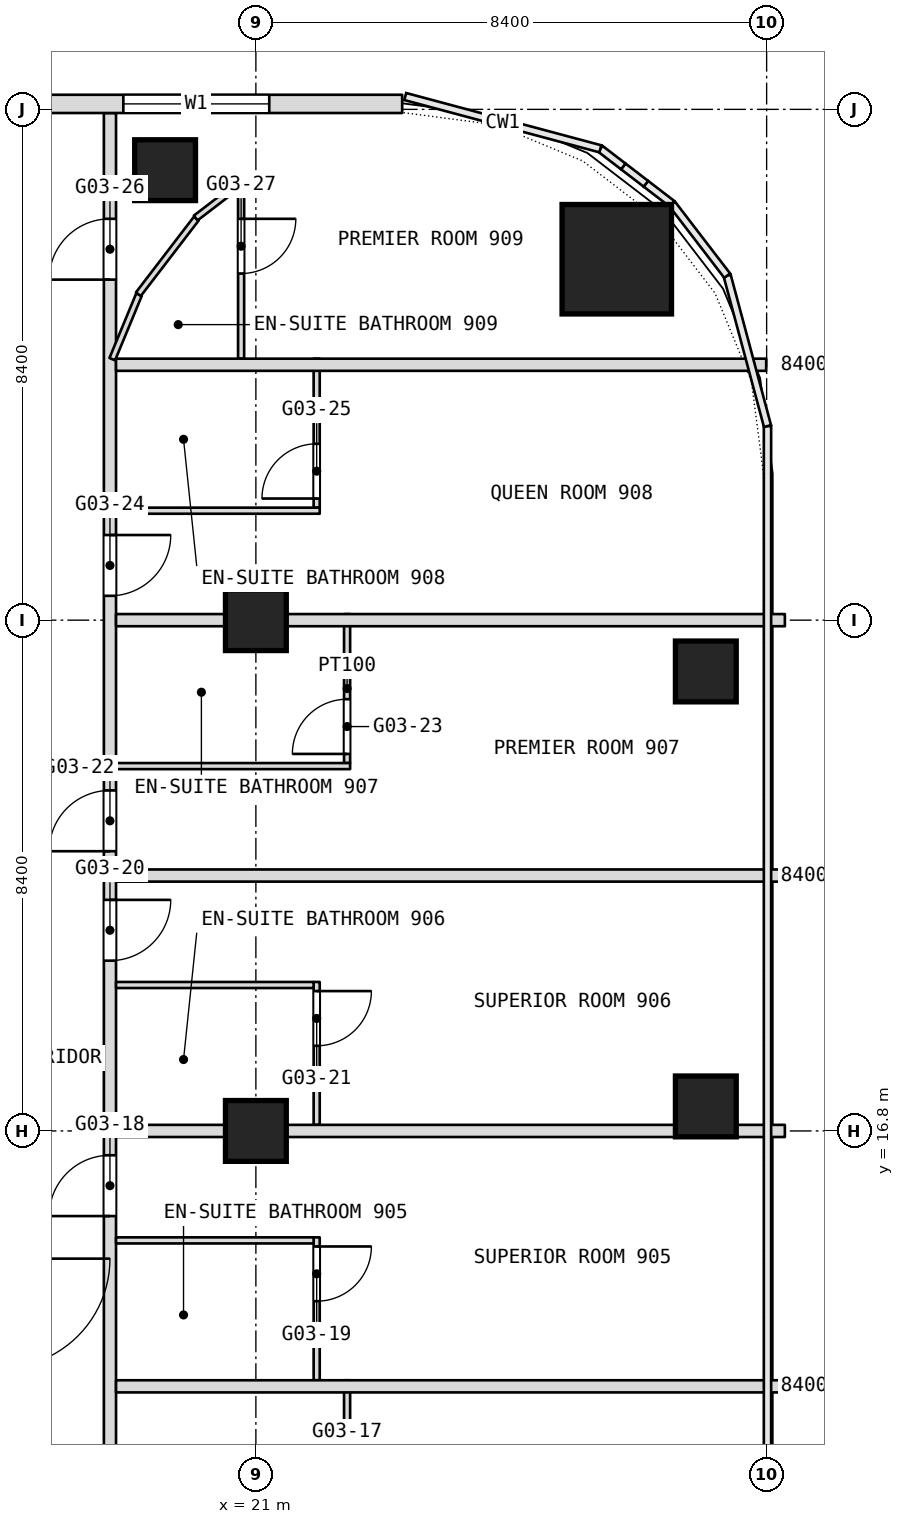
"""IFC4 building model, lengths in metres.
Left out: names, types, materials, properties, quantities, classifications, styles, units other than length and angle.
Written with IfcOpenShell. Run it as: python <this file> out.ifc"""

import sys

from ifc_helpers import new_model, si_unit, direction, frame, frame_2d, origin, origin_2d, place, context, subcontext, project, spatial, rectangle, extrude, element, fill, save


model = new_model("IFC4")
c1 = context("Model", 3, precision=1e-05, world=origin(), true_north=direction((0.0, 1.0)))
c2 = subcontext(c1, "Body", "Model", "MODEL_VIEW")
j1 = project(units=[si_unit("LENGTHUNIT", "METRE"), si_unit("PLANEANGLEUNIT", "RADIAN")], contexts=[c1])
p1 = place(None, origin())
s1 = spatial("IfcSite", under=j1, at=p1, CompositionType="ELEMENT")
p2 = place(p1, origin())
s2 = spatial("IfcBuilding", under=s1, at=p2, CompositionType="ELEMENT")
p3 = place(p2, frame((0.0, 0.0, 47.3)))
s3 = spatial("IfcBuildingStorey", under=s2, at=p3, CompositionType="ELEMENT", Elevation=47.3)
p4 = place(p3, frame((26.936, 31.135, 0.0), z_axis=(0.0, 0.0, 1.0), x_axis=(1.0, 0.0, 0.0)))
e1 = element("IfcColumn", 1, at=p4, inside=s3, PredefinedType="COLUMN", context=c2, shape_type="SweptSolid", body=[
    extrude(rectangle(XDim=1.8, YDim=1.8, at=origin_2d()), origin(), (0.0, 0.0, 1.0), 3.6),
])
for number, where, z_axis, x_axis in (
    (2, (21.0, 16.8, 0.0), (0.0, 0.0, 1.0), (1.0, 0.0, 0.0)),
    (3, (21.0, 25.2, 0.0), (0.0, 0.0, 1.0), (1.0, 0.0, 0.0)),
    (4, (19.507, 32.6, 0.0), (0.0, 0.0, 1.0), (1.0, 0.0, 0.0)),
    (5, (28.4, 24.356, 0.0), (0.0, 0.0, 1.0), (1.0, 0.0, 0.0)),
    (6, (28.4, 17.203, 0.0), (0.0, 0.0, 1.0), (1.0, 0.0, 0.0)),
):
    element("IfcColumn", number, at=place(p3, frame(where, z_axis=z_axis, x_axis=x_axis)), inside=s3, PredefinedType="COLUMN", context=c2, shape_type="SweptSolid", body=[
        extrude(rectangle(XDim=1.0, YDim=1.0, at=origin_2d()), origin(), (0.0, 0.0, 1.0), 3.6),
    ])
p5 = place(p3, frame((22.5, 10.25, 0.0), z_axis=(0.0, 0.0, 1.0), x_axis=(0.0, 1.0, 0.0)))
e7 = element("IfcWall", 7, at=p5, inside=s3, PredefinedType="PARTITIONING", context=c2, shape_type="SweptSolid", body=[
    extrude(rectangle(XDim=2.45, YDim=0.1, at=frame_2d((1.225, 0.0))), origin(), (0.0, 0.0, 1.0), 3.34),
])
p6 = place(p5, frame((0.15, 0.0, 0.0)))
e8 = element("IfcOpeningElement", 8, at=p6, cuts=e7, PredefinedType="OPENING", context=c2, shape_type="SweptSolid", body=[
    extrude(rectangle(XDim=0.9, YDim=2.1, at=frame_2d((0.45, 1.05))), frame((0.0, 0.05, 0.0), z_axis=(0.0, -1.0, 0.0), x_axis=(1.0, 0.0, 0.0)), (0.0, 0.0, 1.0), 0.1),
])
p7 = place(p3, frame((22.5, 22.85, 0.0), z_axis=(0.0, 0.0, 1.0), x_axis=(0.0, 1.0, 0.0)))
e9 = element("IfcWall", 9, at=p7, inside=s3, PredefinedType="PARTITIONING", context=c2, shape_type="SweptSolid", body=[
    extrude(rectangle(XDim=2.45, YDim=0.1, at=frame_2d((1.225, 0.0))), origin(), (0.0, 0.0, 1.0), 3.34),
])
p8 = place(p7, frame((0.15, 0.0, 0.0)))
e10 = element("IfcOpeningElement", 10, at=p8, cuts=e9, PredefinedType="OPENING", context=c2, shape_type="SweptSolid", body=[
    extrude(rectangle(XDim=0.9, YDim=2.1, at=frame_2d((0.45, 1.05))), frame((0.0, 0.05, 0.0), z_axis=(0.0, -1.0, 0.0), x_axis=(1.0, 0.0, 0.0)), (0.0, 0.0, 1.0), 0.1),
])
p9 = place(p3, frame((22.0, 12.7, 0.0), z_axis=(0.0, 0.0, 1.0), x_axis=(0.0, 1.0, 0.0)))
e11 = element("IfcWall", 11, at=p9, inside=s3, PredefinedType="PARTITIONING", context=c2, shape_type="SweptSolid", body=[
    extrude(rectangle(XDim=2.35, YDim=0.1, at=frame_2d((1.175, 0.0))), origin(), (0.0, 0.0, 1.0), 3.34),
])
p10 = place(p9, frame((1.3, 0.0, 0.0)))
e12 = element("IfcOpeningElement", 12, at=p10, cuts=e11, PredefinedType="OPENING", context=c2, shape_type="SweptSolid", body=[
    extrude(rectangle(XDim=0.9, YDim=2.1, at=frame_2d((0.45, 1.05))), frame((0.0, 0.05, 0.0), z_axis=(0.0, -1.0, 0.0), x_axis=(1.0, 0.0, 0.0)), (0.0, 0.0, 1.0), 0.1),
])
p11 = place(p3, frame((22.0, 16.9, 0.0), z_axis=(0.0, 0.0, 1.0), x_axis=(0.0, 1.0, 0.0)))
e13 = element("IfcWall", 13, at=p11, inside=s3, PredefinedType="PARTITIONING", context=c2, shape_type="SweptSolid", body=[
    extrude(rectangle(XDim=2.35, YDim=0.1, at=frame_2d((1.175, 0.0))), origin(), (0.0, 0.0, 1.0), 3.34),
])
p12 = place(p11, frame((1.3, 0.0, 0.0)))
e14 = element("IfcOpeningElement", 14, at=p12, cuts=e13, PredefinedType="OPENING", context=c2, shape_type="SweptSolid", body=[
    extrude(rectangle(XDim=0.9, YDim=2.1, at=frame_2d((0.45, 1.05))), frame((0.0, 0.05, 0.0), z_axis=(0.0, -1.0, 0.0), x_axis=(1.0, 0.0, 0.0)), (0.0, 0.0, 1.0), 0.1),
])
p13 = place(p3, frame((22.0, 27.05, 0.0), z_axis=(0.0, 0.0, 1.0), x_axis=(0.0, 1.0, 0.0)))
e15 = element("IfcWall", 15, at=p13, inside=s3, PredefinedType="PARTITIONING", context=c2, shape_type="SweptSolid", body=[
    extrude(rectangle(XDim=2.45, YDim=0.1, at=frame_2d((1.225, 0.0))), origin(), (0.0, 0.0, 1.0), 3.34),
])
p14 = place(p13, frame((0.15, 0.0, 0.0)))
e16 = element("IfcOpeningElement", 16, at=p14, cuts=e15, PredefinedType="OPENING", context=c2, shape_type="SweptSolid", body=[
    extrude(rectangle(XDim=0.9, YDim=2.1, at=frame_2d((0.45, 1.05))), frame((0.0, 0.05, 0.0), z_axis=(0.0, -1.0, 0.0), x_axis=(1.0, 0.0, 0.0)), (0.0, 0.0, 1.0), 0.1),
])
p15 = place(p3, frame((20.757, 29.5, 0.0), z_axis=(0.0, 0.0, 1.0), x_axis=(0.0, 1.0, 0.0)))
e17 = element("IfcWall", 17, at=p15, inside=s3, PredefinedType="PARTITIONING", context=c2, shape_type="SweptSolid", body=[
    extrude(rectangle(XDim=2.935, YDim=0.1, at=frame_2d((1.468, 0.0))), origin(), (0.0, 0.0, 1.0), 3.34),
])
p16 = place(p15, frame((1.4, 0.0, 0.0)))
e18 = element("IfcOpeningElement", 18, at=p16, cuts=e17, PredefinedType="OPENING", context=c2, shape_type="SweptSolid", body=[
    extrude(rectangle(XDim=0.9, YDim=2.1, at=frame_2d((0.45, 1.05))), frame((0.0, 0.05, 0.0), z_axis=(0.0, -1.0, 0.0), x_axis=(1.0, 0.0, 0.0)), (0.0, 0.0, 1.0), 0.1),
])
p17 = place(p3, frame((18.6, -16.665, 0.0), z_axis=(0.0, 0.0, 1.0), x_axis=(0.0, 1.0, 0.0)))
e19 = element("IfcWall", 19, at=p17, inside=s3, PredefinedType="PARTITIONING", context=c2, shape_type="SweptSolid", body=[
    extrude(rectangle(XDim=50.205, YDim=0.2, at=frame_2d((25.103, 0.0))), origin(), (0.0, 0.0, 1.0), 3.34),
])
p18 = place(p17, frame((5.724, 0.0, 0.0)))
e20 = element("IfcOpeningElement", 20, at=p18, cuts=e19, PredefinedType="OPENING", context=c2, shape_type="SweptSolid", body=[
    extrude(rectangle(XDim=1.1, YDim=2.1, at=frame_2d((0.55, 1.05))), frame((0.0, 0.1, 0.0), z_axis=(0.0, -1.0, 0.0), x_axis=(1.0, 0.0, 0.0)), (0.0, 0.0, 1.0), 0.2),
])
p19 = place(p17, frame((11.865, 0.0, 0.0)))
e21 = element("IfcOpeningElement", 21, at=p19, cuts=e19, PredefinedType="OPENING", context=c2, shape_type="SweptSolid", body=[
    extrude(rectangle(XDim=1.1, YDim=2.1, at=frame_2d((0.55, 1.05))), frame((0.0, 0.1, 0.0), z_axis=(0.0, -1.0, 0.0), x_axis=(1.0, 0.0, 0.0)), (0.0, 0.0, 1.0), 0.2),
])
p20 = place(p17, frame((20.365, 0.0, 0.0)))
e22 = element("IfcOpeningElement", 22, at=p20, cuts=e19, PredefinedType="OPENING", context=c2, shape_type="SweptSolid", body=[
    extrude(rectangle(XDim=1.1, YDim=2.1, at=frame_2d((0.55, 1.05))), frame((0.0, 0.1, 0.0), z_axis=(0.0, -1.0, 0.0), x_axis=(1.0, 0.0, 0.0)), (0.0, 0.0, 1.0), 0.2),
])
p21 = place(p17, frame((25.465, 0.0, 0.0)))
e23 = element("IfcOpeningElement", 23, at=p21, cuts=e19, PredefinedType="OPENING", context=c2, shape_type="SweptSolid", body=[
    extrude(rectangle(XDim=1.0, YDim=2.1, at=frame_2d((0.5, 1.05))), frame((0.0, 0.1, 0.0), z_axis=(0.0, -1.0, 0.0), x_axis=(1.0, 0.0, 0.0)), (0.0, 0.0, 1.0), 0.2),
])
p22 = place(p17, frame((32.065, 0.0, 0.0)))
e24 = element("IfcOpeningElement", 24, at=p22, cuts=e19, PredefinedType="OPENING", context=c2, shape_type="SweptSolid", body=[
    extrude(rectangle(XDim=1.0, YDim=2.1, at=frame_2d((0.5, 1.05))), frame((0.0, 0.1, 0.0), z_axis=(0.0, -1.0, 0.0), x_axis=(1.0, 0.0, 0.0)), (0.0, 0.0, 1.0), 0.2),
])
p23 = place(p17, frame((36.265, 0.0, 0.0)))
e25 = element("IfcOpeningElement", 25, at=p23, cuts=e19, PredefinedType="OPENING", context=c2, shape_type="SweptSolid", body=[
    extrude(rectangle(XDim=1.0, YDim=2.1, at=frame_2d((0.5, 1.05))), frame((0.0, 0.1, 0.0), z_axis=(0.0, -1.0, 0.0), x_axis=(1.0, 0.0, 0.0)), (0.0, 0.0, 1.0), 0.2),
])
p24 = place(p17, frame((38.065, 0.0, 0.0)))
e26 = element("IfcOpeningElement", 26, at=p24, cuts=e19, PredefinedType="OPENING", context=c2, shape_type="SweptSolid", body=[
    extrude(rectangle(XDim=1.0, YDim=2.1, at=frame_2d((0.5, 1.05))), frame((0.0, 0.1, 0.0), z_axis=(0.0, -1.0, 0.0), x_axis=(1.0, 0.0, 0.0)), (0.0, 0.0, 1.0), 0.2),
])
p25 = place(p17, frame((42.265, 0.0, 0.0)))
e27 = element("IfcOpeningElement", 27, at=p25, cuts=e19, PredefinedType="OPENING", context=c2, shape_type="SweptSolid", body=[
    extrude(rectangle(XDim=1.0, YDim=2.1, at=frame_2d((0.5, 1.05))), frame((0.0, 0.1, 0.0), z_axis=(0.0, -1.0, 0.0), x_axis=(1.0, 0.0, 0.0)), (0.0, 0.0, 1.0), 0.2),
])
p26 = place(p17, frame((47.465, 0.0, 0.0)))
e28 = element("IfcOpeningElement", 28, at=p26, cuts=e19, PredefinedType="OPENING", context=c2, shape_type="SweptSolid", body=[
    extrude(rectangle(XDim=1.0, YDim=2.1, at=frame_2d((0.5, 1.05))), frame((0.0, 0.1, 0.0), z_axis=(0.0, -1.0, 0.0), x_axis=(1.0, 0.0, 0.0)), (0.0, 0.0, 1.0), 0.2),
])
p27 = place(p3, frame((18.638, 29.492, 0.0), z_axis=(0.0, 0.0, 1.0), x_axis=(0.382714431757, 0.923866691533, 0.0)))
e29 = element("IfcWall", 29, at=p27, inside=s3, PredefinedType="PARTITIONING", context=c2, shape_type="SweptSolid", body=[
    extrude(rectangle(XDim=1.149, YDim=0.1, at=frame_2d((0.575, 0.0))), origin(), (0.0, 0.0, 1.0), 3.34),
])
p28 = place(p3, frame((19.067, 30.56, 0.0), z_axis=(0.0, 0.0, 1.0), x_axis=(0.608519892166, 0.793538619626, 0.0)))
e30 = element("IfcWall", 30, at=p28, inside=s3, PredefinedType="PARTITIONING", context=c2, shape_type="SweptSolid", body=[
    extrude(rectangle(XDim=1.566, YDim=0.1, at=frame_2d((0.783, 0.0))), origin(), (0.0, 0.0, 1.0), 3.34),
])
p29 = place(p3, frame((18.7, 12.6, 0.0), z_axis=(0.0, 0.0, 1.0), x_axis=(1.0, 0.0, 0.0)))
e31 = element("IfcWall", 31, at=p29, inside=s3, PredefinedType="PARTITIONING", context=c2, shape_type="SweptSolid", body=[
    extrude(rectangle(XDim=11.0, YDim=0.2, at=frame_2d((5.5, 0.0))), origin(), (0.0, 0.0, 1.0), 3.34),
])
p30 = place(p3, frame((20.01, 31.813, 0.0), z_axis=(0.0, 0.0, 1.0), x_axis=(0.793641646693, 0.608385516457, 0.0)))
e32 = element("IfcWall", 32, at=p30, inside=s3, PredefinedType="PARTITIONING", context=c2, shape_type="SweptSolid", body=[
    extrude(rectangle(XDim=0.891, YDim=0.1, at=frame_2d((0.445, 0.0))), origin(), (0.0, 0.0, 1.0), 3.34),
])
p31 = place(p3, frame((18.7, 15.0, 0.0), z_axis=(0.0, 0.0, 1.0), x_axis=(1.0, 0.0, 0.0)))
e33 = element("IfcWall", 33, at=p31, inside=s3, PredefinedType="PARTITIONING", context=c2, shape_type="SweptSolid", body=[
    extrude(rectangle(XDim=3.25, YDim=0.1, at=frame_2d((1.625, 0.0))), origin(), (0.0, 0.0, 1.0), 3.34),
])
p32 = place(p3, frame((18.7, 16.8, 0.0), z_axis=(0.0, 0.0, 1.0), x_axis=(1.0, 0.0, 0.0)))
e34 = element("IfcWall", 34, at=p32, inside=s3, PredefinedType="PARTITIONING", context=c2, shape_type="SweptSolid", body=[
    extrude(rectangle(XDim=11.0, YDim=0.2, at=frame_2d((5.5, 0.0))), origin(), (0.0, 0.0, 1.0), 2.84),
])
p33 = place(p3, frame((18.7, 19.2, 0.0), z_axis=(0.0, 0.0, 1.0), x_axis=(1.0, 0.0, 0.0)))
e35 = element("IfcWall", 35, at=p33, inside=s3, PredefinedType="PARTITIONING", context=c2, shape_type="SweptSolid", body=[
    extrude(rectangle(XDim=3.25, YDim=0.1, at=frame_2d((1.625, 0.0))), origin(), (0.0, 0.0, 1.0), 3.34),
])
p34 = place(p3, frame((18.7, 21.0, 0.0), z_axis=(0.0, 0.0, 1.0), x_axis=(1.0, 0.0, 0.0)))
e36 = element("IfcWall", 36, at=p34, inside=s3, PredefinedType="PARTITIONING", context=c2, shape_type="SweptSolid", body=[
    extrude(rectangle(XDim=11.0, YDim=0.2, at=frame_2d((5.5, 0.0))), origin(), (0.0, 0.0, 1.0), 3.34),
])
p35 = place(p3, frame((18.7, 22.8, 0.0), z_axis=(0.0, 0.0, 1.0), x_axis=(1.0, 0.0, 0.0)))
e37 = element("IfcWall", 37, at=p35, inside=s3, PredefinedType="PARTITIONING", context=c2, shape_type="SweptSolid", body=[
    extrude(rectangle(XDim=3.85, YDim=0.1, at=frame_2d((1.925, 0.0))), origin(), (0.0, 0.0, 1.0), 3.34),
])
p36 = place(p3, frame((18.7, 25.2, 0.0), z_axis=(0.0, 0.0, 1.0), x_axis=(1.0, 0.0, 0.0)))
e38 = element("IfcWall", 38, at=p36, inside=s3, PredefinedType="PARTITIONING", context=c2, shape_type="SweptSolid", body=[
    extrude(rectangle(XDim=11.0, YDim=0.2, at=frame_2d((5.5, 0.0))), origin(), (0.0, 0.0, 1.0), 2.84),
])
p37 = place(p3, frame((18.7, 27.0, 0.0), z_axis=(0.0, 0.0, 1.0), x_axis=(1.0, 0.0, 0.0)))
e39 = element("IfcWall", 39, at=p37, inside=s3, PredefinedType="PARTITIONING", context=c2, shape_type="SweptSolid", body=[
    extrude(rectangle(XDim=3.35, YDim=0.1, at=frame_2d((1.675, 0.0))), origin(), (0.0, 0.0, 1.0), 3.34),
])
p38 = place(p3, frame((18.7, 29.4, 0.0), z_axis=(0.0, 0.0, 1.0), x_axis=(1.0, 0.0, 0.0)))
e40 = element("IfcWall", 40, at=p38, inside=s3, PredefinedType="PARTITIONING", context=c2, shape_type="SweptSolid", body=[
    extrude(rectangle(XDim=10.693, YDim=0.2, at=frame_2d((5.347, 0.0))), origin(), (0.0, 0.0, 1.0), 3.34),
])
p39 = place(p3, frame((23.406, 33.69, 0.0), z_axis=(0.0, 0.0, 1.0), x_axis=(-1.0, 0.0, 0.0)))
e41 = element("IfcWall", 41, at=p39, inside=s3, PredefinedType="NOTDEFINED", context=c2, shape_type="SweptSolid", body=[
    extrude(rectangle(XDim=46.812, YDim=0.3, at=frame_2d((23.406, 0.0))), origin(), (0.0, 0.0, 1.0), 3.6),
])
p40 = place(p39, frame((2.186, 0.0, 0.9)))
e42 = element("IfcOpeningElement", 42, at=p40, cuts=e41, PredefinedType="OPENING", context=c2, shape_type="SweptSolid", body=[
    extrude(rectangle(XDim=2.4, YDim=2.1, at=frame_2d((1.2, 1.05))), frame((0.0, 0.15, 0.0), z_axis=(0.0, -1.0, 0.0), x_axis=(1.0, 0.0, 0.0)), (0.0, 0.0, 1.0), 0.3),
])
p41 = place(p39, frame((7.506, 0.0, 0.9)))
e43 = element("IfcOpeningElement", 43, at=p41, cuts=e41, PredefinedType="OPENING", context=c2, shape_type="SweptSolid", body=[
    extrude(rectangle(XDim=2.4, YDim=2.1, at=frame_2d((1.2, 1.05))), frame((0.0, 0.15, 0.0), z_axis=(0.0, -1.0, 0.0), x_axis=(1.0, 0.0, 0.0)), (0.0, 0.0, 1.0), 0.3),
])
p42 = place(p39, frame((11.706, 0.0, 0.9)))
e44 = element("IfcOpeningElement", 44, at=p42, cuts=e41, PredefinedType="OPENING", context=c2, shape_type="SweptSolid", body=[
    extrude(rectangle(XDim=2.4, YDim=2.1, at=frame_2d((1.2, 1.05))), frame((0.0, 0.15, 0.0), z_axis=(0.0, -1.0, 0.0), x_axis=(1.0, 0.0, 0.0)), (0.0, 0.0, 1.0), 0.3),
])
p43 = place(p39, frame((15.906, 0.0, 0.9)))
e45 = element("IfcOpeningElement", 45, at=p43, cuts=e41, PredefinedType="OPENING", context=c2, shape_type="SweptSolid", body=[
    extrude(rectangle(XDim=2.4, YDim=2.1, at=frame_2d((1.2, 1.05))), frame((0.0, 0.15, 0.0), z_axis=(0.0, -1.0, 0.0), x_axis=(1.0, 0.0, 0.0)), (0.0, 0.0, 1.0), 0.3),
])
p44 = place(p39, frame((20.106, 0.0, 0.9)))
e46 = element("IfcOpeningElement", 46, at=p44, cuts=e41, PredefinedType="OPENING", context=c2, shape_type="SweptSolid", body=[
    extrude(rectangle(XDim=2.4, YDim=2.1, at=frame_2d((1.2, 1.05))), frame((0.0, 0.15, 0.0), z_axis=(0.0, -1.0, 0.0), x_axis=(1.0, 0.0, 0.0)), (0.0, 0.0, 1.0), 0.3),
])
p45 = place(p39, frame((24.306, 0.0, 0.9)))
e47 = element("IfcOpeningElement", 47, at=p45, cuts=e41, PredefinedType="OPENING", context=c2, shape_type="SweptSolid", body=[
    extrude(rectangle(XDim=2.4, YDim=2.1, at=frame_2d((1.2, 1.05))), frame((0.0, 0.15, 0.0), z_axis=(0.0, -1.0, 0.0), x_axis=(1.0, 0.0, 0.0)), (0.0, 0.0, 1.0), 0.3),
])
p46 = place(p39, frame((28.506, 0.0, 0.9)))
e48 = element("IfcOpeningElement", 48, at=p46, cuts=e41, PredefinedType="OPENING", context=c2, shape_type="SweptSolid", body=[
    extrude(rectangle(XDim=2.4, YDim=2.1, at=frame_2d((1.2, 1.05))), frame((0.0, 0.15, 0.0), z_axis=(0.0, -1.0, 0.0), x_axis=(1.0, 0.0, 0.0)), (0.0, 0.0, 1.0), 0.3),
])
p47 = place(p39, frame((32.706, 0.0, 0.9)))
e49 = element("IfcOpeningElement", 49, at=p47, cuts=e41, PredefinedType="OPENING", context=c2, shape_type="SweptSolid", body=[
    extrude(rectangle(XDim=2.4, YDim=2.1, at=frame_2d((1.2, 1.05))), frame((0.0, 0.15, 0.0), z_axis=(0.0, -1.0, 0.0), x_axis=(1.0, 0.0, 0.0)), (0.0, 0.0, 1.0), 0.3),
])
p48 = place(p39, frame((36.906, 0.0, 0.9)))
e50 = element("IfcOpeningElement", 50, at=p48, cuts=e41, PredefinedType="OPENING", context=c2, shape_type="SweptSolid", body=[
    extrude(rectangle(XDim=2.4, YDim=2.1, at=frame_2d((1.2, 1.05))), frame((0.0, 0.15, 0.0), z_axis=(0.0, -1.0, 0.0), x_axis=(1.0, 0.0, 0.0)), (0.0, 0.0, 1.0), 0.3),
])
p49 = place(p39, frame((42.226, 0.0, 0.9)))
e51 = element("IfcOpeningElement", 51, at=p49, cuts=e41, PredefinedType="OPENING", context=c2, shape_type="SweptSolid", body=[
    extrude(rectangle(XDim=2.4, YDim=2.1, at=frame_2d((1.2, 1.05))), frame((0.0, 0.15, 0.0), z_axis=(0.0, -1.0, 0.0), x_axis=(1.0, 0.0, 0.0)), (0.0, 0.0, 1.0), 0.3),
])
p50 = place(p8, origin())
e52 = element("IfcDoor", 52, at=p50, inside=s3, OperationType="SINGLE_SWING_LEFT", PredefinedType="DOOR", context=c2, shape_type="SweptSolid", body=[
    extrude(rectangle(XDim=0.9, YDim=2.1, at=frame_2d((0.45, 1.05))), frame((0.0, 0.025, 0.0), z_axis=(0.0, -1.0, 0.0), x_axis=(1.0, 0.0, 0.0)), (0.0, 0.0, 1.0), 0.05),
])
fill(e10, e52)
p51 = place(p10, origin())
e53 = element("IfcDoor", 53, at=p51, inside=s3, OperationType="SINGLE_SWING_RIGHT", PredefinedType="DOOR", context=c2, shape_type="SweptSolid", body=[
    extrude(rectangle(XDim=0.9, YDim=2.1, at=frame_2d((0.45, 1.05))), frame((0.0, 0.025, 0.0), z_axis=(0.0, -1.0, 0.0), x_axis=(1.0, 0.0, 0.0)), (0.0, 0.0, 1.0), 0.05),
])
fill(e12, e53)
p52 = place(p12, origin())
e54 = element("IfcDoor", 54, at=p52, inside=s3, OperationType="SINGLE_SWING_RIGHT", PredefinedType="DOOR", context=c2, shape_type="SweptSolid", body=[
    extrude(rectangle(XDim=0.9, YDim=2.1, at=frame_2d((0.45, 1.05))), frame((0.0, 0.025, 0.0), z_axis=(0.0, -1.0, 0.0), x_axis=(1.0, 0.0, 0.0)), (0.0, 0.0, 1.0), 0.05),
])
fill(e14, e54)
p53 = place(p14, origin())
e55 = element("IfcDoor", 55, at=p53, inside=s3, OperationType="SINGLE_SWING_LEFT", PredefinedType="DOOR", context=c2, shape_type="SweptSolid", body=[
    extrude(rectangle(XDim=0.9, YDim=2.1, at=frame_2d((0.45, 1.05))), frame((0.0, 0.025, 0.0), z_axis=(0.0, -1.0, 0.0), x_axis=(1.0, 0.0, 0.0)), (0.0, 0.0, 1.0), 0.05),
])
fill(e16, e55)
p54 = place(p16, origin())
e56 = element("IfcDoor", 56, at=p54, inside=s3, OperationType="SINGLE_SWING_RIGHT", PredefinedType="DOOR", context=c2, shape_type="SweptSolid", body=[
    extrude(rectangle(XDim=0.9, YDim=2.1, at=frame_2d((0.45, 1.05))), frame((0.0, 0.025, 0.0), z_axis=(0.0, -1.0, 0.0), x_axis=(1.0, 0.0, 0.0)), (0.0, 0.0, 1.0), 0.05),
])
fill(e18, e56)
p55 = place(p22, origin())
e57 = element("IfcDoor", 57, at=p55, inside=s3, OperationType="SINGLE_SWING_RIGHT", PredefinedType="DOOR", context=c2, shape_type="SweptSolid", body=[
    extrude(rectangle(XDim=1.0, YDim=2.1, at=frame_2d((0.5, 1.05))), frame((0.0, 0.025, 0.0), z_axis=(0.0, -1.0, 0.0), x_axis=(1.0, 0.0, 0.0)), (0.0, 0.0, 1.0), 0.05),
])
fill(e24, e57)
p56 = place(p23, origin())
e58 = element("IfcDoor", 58, at=p56, inside=s3, OperationType="SINGLE_SWING_RIGHT", PredefinedType="DOOR", context=c2, shape_type="SweptSolid", body=[
    extrude(rectangle(XDim=1.0, YDim=2.1, at=frame_2d((0.5, 1.05))), frame((0.0, 0.025, 0.0), z_axis=(0.0, -1.0, 0.0), x_axis=(1.0, 0.0, 0.0)), (0.0, 0.0, 1.0), 0.05),
])
fill(e25, e58)
p57 = place(p24, origin())
e59 = element("IfcDoor", 59, at=p57, inside=s3, OperationType="SINGLE_SWING_RIGHT", PredefinedType="DOOR", context=c2, shape_type="SweptSolid", body=[
    extrude(rectangle(XDim=1.0, YDim=2.1, at=frame_2d((0.5, 1.05))), frame((0.0, 0.025, 0.0), z_axis=(0.0, -1.0, 0.0), x_axis=(1.0, 0.0, 0.0)), (0.0, 0.0, 1.0), 0.05),
])
fill(e26, e59)
p58 = place(p25, origin())
e60 = element("IfcDoor", 60, at=p58, inside=s3, OperationType="SINGLE_SWING_RIGHT", PredefinedType="DOOR", context=c2, shape_type="SweptSolid", body=[
    extrude(rectangle(XDim=1.0, YDim=2.1, at=frame_2d((0.5, 1.05))), frame((0.0, 0.025, 0.0), z_axis=(0.0, -1.0, 0.0), x_axis=(1.0, 0.0, 0.0)), (0.0, 0.0, 1.0), 0.05),
])
fill(e27, e60)
p59 = place(p26, origin())
e61 = element("IfcDoor", 61, at=p59, inside=s3, OperationType="SINGLE_SWING_RIGHT", PredefinedType="DOOR", context=c2, shape_type="SweptSolid", body=[
    extrude(rectangle(XDim=1.0, YDim=2.1, at=frame_2d((0.5, 1.05))), frame((0.0, 0.025, 0.0), z_axis=(0.0, -1.0, 0.0), x_axis=(1.0, 0.0, 0.0)), (0.0, 0.0, 1.0), 0.05),
])
fill(e28, e61)
p60 = place(p40, origin())
e62 = element("IfcWindow", 62, at=p60, inside=s3, PartitioningType="SINGLE_PANEL", PredefinedType="WINDOW", context=c2, shape_type="SweptSolid", body=[
    extrude(rectangle(XDim=2.4, YDim=2.1, at=frame_2d((1.2, 1.05))), frame((0.0, 0.03, 0.0), z_axis=(0.0, -1.0, 0.0), x_axis=(1.0, 0.0, 0.0)), (0.0, 0.0, 1.0), 0.06),
])
fill(e42, e62)
save(model, sys.argv[1])
